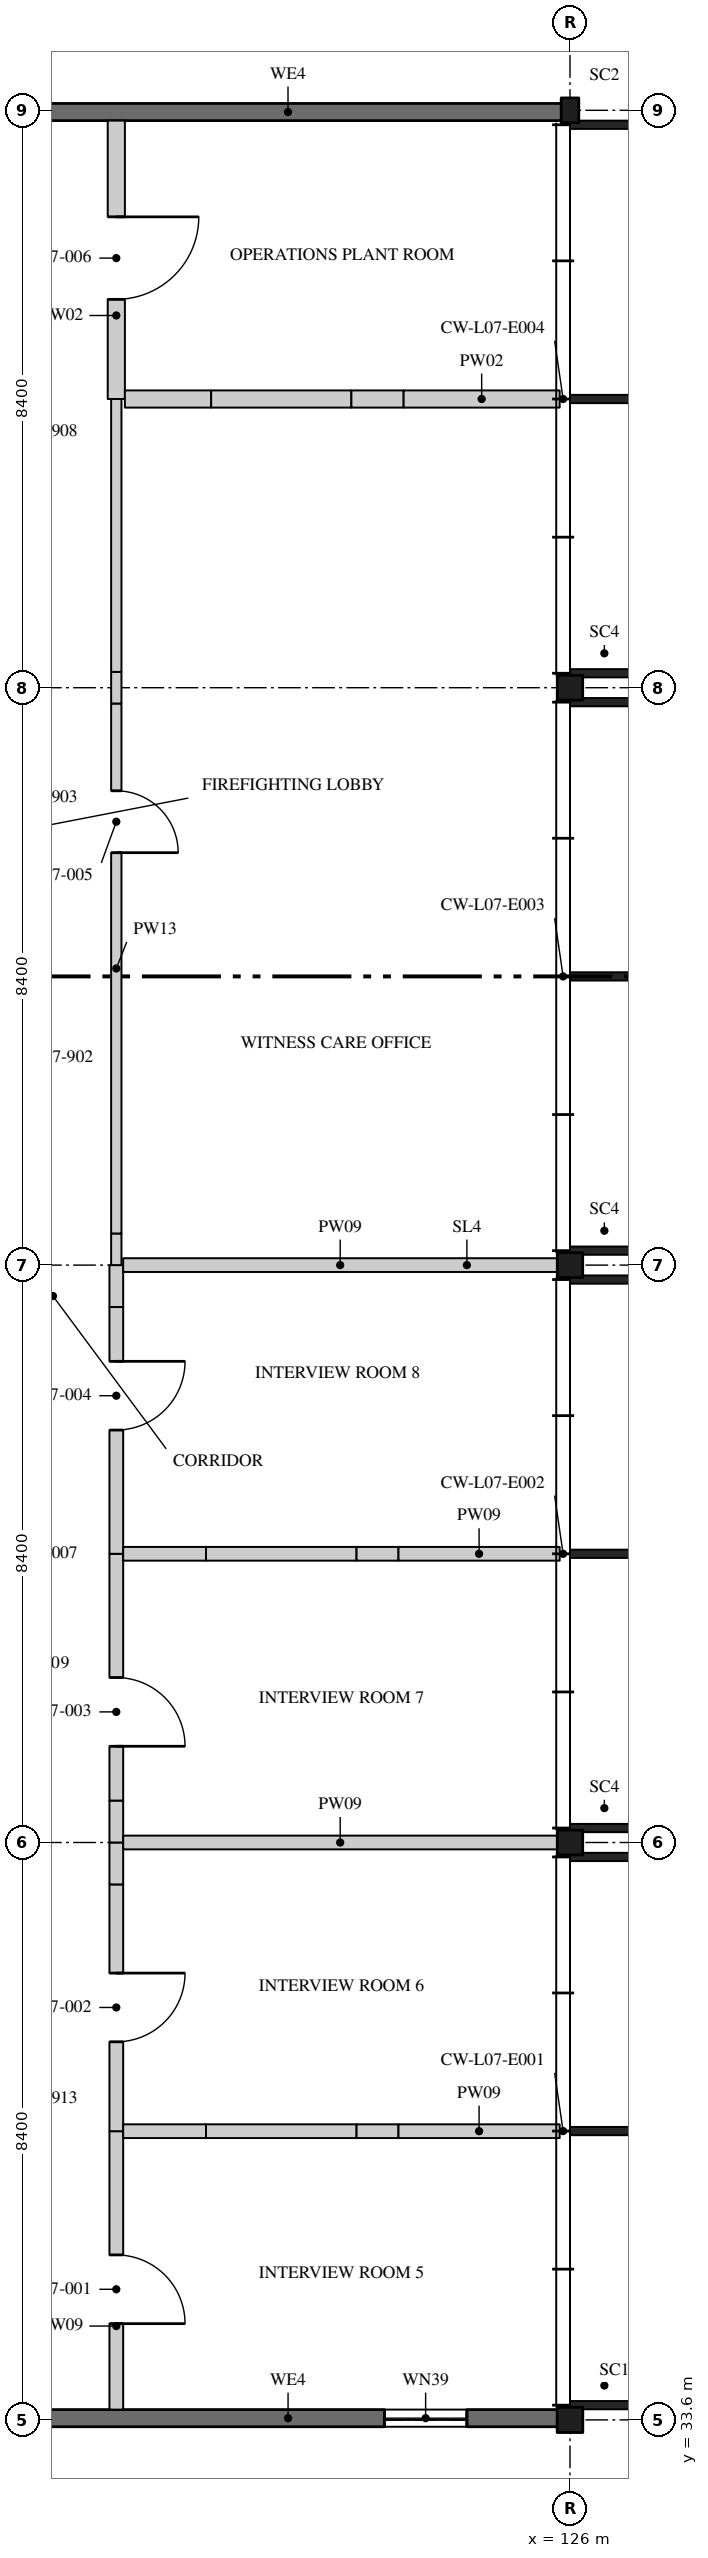
"""IFC4 building model, lengths in metres.
Left out: names, types, materials, properties, quantities, classifications, styles, units other than length and angle.
Written with IfcOpenShell. Run it as: python <this file> out.ifc"""

import sys

from ifc_helpers import new_model, si_unit, direction, frame, frame_2d, origin, origin_2d, place, context, subcontext, project, spatial, rectangle, i_section, extrude, element, fill, save


model = new_model("IFC4")
c1 = context("Model", 3, precision=1e-05, world=origin(), true_north=direction((0.0, 1.0)))
c2 = subcontext(c1, "Body", "Model", "MODEL_VIEW")
j1 = project(units=[si_unit("LENGTHUNIT", "METRE"), si_unit("PLANEANGLEUNIT", "RADIAN")], contexts=[c1])
p1 = place(None, origin())
s1 = spatial("IfcSite", under=j1, at=p1, CompositionType="ELEMENT")
p2 = place(p1, origin())
s2 = spatial("IfcBuilding", under=s1, at=p2, CompositionType="ELEMENT")
p3 = place(p2, frame((0.0, 0.0, 32.4)))
s3 = spatial("IfcBuildingStorey", under=s2, at=p3, CompositionType="ELEMENT", Elevation=32.4)
p4 = place(p3, frame((126.0, 33.6, 0.0), z_axis=(0.0, 0.0, 1.0), x_axis=(1.0, 0.0, 0.0)))
e1 = element("IfcColumn", 1, at=p4, inside=s3, PredefinedType="COLUMN", context=c2, shape_type="SweptSolid", body=[
    extrude(i_section(OverallWidth=0.373, OverallDepth=0.368, WebThickness=0.015, FlangeThickness=0.024, FilletRadius=0.015, at=origin_2d()), origin(), (0.0, 0.0, 1.0), 4.37),
])
for number, where, z_axis, x_axis in (
    (2, (126.0, 42.0, 0.0), (0.0, 0.0, 1.0), (1.0, 0.0, 0.0)),
    (3, (126.0, 50.4, 0.0), (0.0, 0.0, 1.0), (1.0, 0.0, 0.0)),
    (4, (126.0, 58.8, 0.0), (0.0, 0.0, 1.0), (1.0, 0.0, 0.0)),
):
    element("IfcColumn", number, at=place(p3, frame(where, z_axis=z_axis, x_axis=x_axis)), inside=s3, PredefinedType="COLUMN", context=c2, shape_type="SweptSolid", body=[
        extrude(i_section(OverallWidth=0.371, OverallDepth=0.361, WebThickness=0.012, FlangeThickness=0.02, FilletRadius=0.015, at=origin_2d()), origin(), (0.0, 0.0, 1.0), 4.37),
    ])
p5 = place(p3, frame((126.0, 67.2, 0.0), z_axis=(0.0, 0.0, 1.0), x_axis=(1.0, 0.0, 0.0)))
e5 = element("IfcColumn", 5, at=p5, inside=s3, PredefinedType="COLUMN", context=c2, shape_type="SweptSolid", body=[
    extrude(i_section(OverallWidth=0.257, OverallDepth=0.361, WebThickness=0.011, FlangeThickness=0.02, FilletRadius=0.015, at=origin_2d()), origin(), (0.0, 0.0, 1.0), 4.37),
])
p6 = place(p3, frame((119.4, 33.75, 0.0), z_axis=(0.0, 0.0, 1.0), x_axis=(0.0, 1.0, 0.0)))
e6 = element("IfcWall", 6, at=p6, inside=s3, PredefinedType="PARTITIONING", context=c2, shape_type="SweptSolid", body=[
    extrude(rectangle(XDim=4.05, YDim=0.2, at=frame_2d((2.025, 0.0))), origin(), (0.0, 0.0, 1.0), 4.37),
])
p7 = place(p6, frame((1.25, 0.0, 0.0)))
e7 = element("IfcOpeningElement", 7, at=p7, cuts=e6, PredefinedType="OPENING", context=c2, shape_type="SweptSolid", body=[
    extrude(rectangle(XDim=1.0, YDim=2.1, at=frame_2d((0.5, 1.05))), frame((0.0, 0.11, 0.0), z_axis=(0.0, -1.0, 0.0), x_axis=(1.0, 0.0, 0.0)), (0.0, 0.0, 1.0), 0.22),
])
p8 = place(p3, frame((119.4, 37.8, 0.0), z_axis=(0.0, 0.0, 1.0), x_axis=(0.0, 1.0, 0.0)))
e8 = element("IfcWall", 8, at=p8, inside=s3, PredefinedType="PARTITIONING", context=c2, shape_type="SweptSolid", body=[
    extrude(rectangle(XDim=3.59, YDim=0.2, at=frame_2d((1.795, 0.0))), origin(), (0.0, 0.0, 1.0), 4.37),
])
p9 = place(p8, frame((1.3, 0.0, 0.0)))
e9 = element("IfcOpeningElement", 9, at=p9, cuts=e8, PredefinedType="OPENING", context=c2, shape_type="SweptSolid", body=[
    extrude(rectangle(XDim=1.0, YDim=2.1, at=frame_2d((0.5, 1.05))), frame((0.0, 0.11, 0.0), z_axis=(0.0, -1.0, 0.0), x_axis=(1.0, 0.0, 0.0)), (0.0, 0.0, 1.0), 0.22),
])
for number, where, z_axis, x_axis in (
    (10, (119.4, 41.39, 0.0), (0.0, 0.0, 1.0), (0.0, 1.0, 0.0)),
    (11, (119.4, 42.0, 0.0), (0.0, 0.0, 1.0), (0.0, 1.0, 0.0)),
):
    element("IfcWall", number, at=place(p3, frame(where, z_axis=z_axis, x_axis=x_axis)), inside=s3, PredefinedType="PARTITIONING", context=c2, shape_type="SweptSolid", body=[
        extrude(rectangle(XDim=0.61, YDim=0.2, at=frame_2d((0.305, 0.0))), origin(), (0.0, 0.0, 1.0), 3.746),
    ])
p10 = place(p3, frame((119.4, 42.61, 0.0), z_axis=(0.0, 0.0, 1.0), x_axis=(0.0, 1.0, 0.0)))
e12 = element("IfcWall", 12, at=p10, inside=s3, PredefinedType="PARTITIONING", context=c2, shape_type="SweptSolid", body=[
    extrude(rectangle(XDim=3.59, YDim=0.2, at=frame_2d((1.795, 0.0))), origin(), (0.0, 0.0, 1.0), 4.37),
])
p11 = place(p10, frame((0.79, 0.0, 0.0)))
e13 = element("IfcOpeningElement", 13, at=p11, cuts=e12, PredefinedType="OPENING", context=c2, shape_type="SweptSolid", body=[
    extrude(rectangle(XDim=1.0, YDim=2.1, at=frame_2d((0.5, 1.05))), frame((0.0, 0.11, 0.0), z_axis=(0.0, -1.0, 0.0), x_axis=(1.0, 0.0, 0.0)), (0.0, 0.0, 1.0), 0.22),
])
p12 = place(p3, frame((119.4, 46.2, 0.0), z_axis=(0.0, 0.0, 1.0), x_axis=(0.0, 1.0, 0.0)))
e14 = element("IfcWall", 14, at=p12, inside=s3, PredefinedType="PARTITIONING", context=c2, shape_type="SweptSolid", body=[
    extrude(rectangle(XDim=3.59, YDim=0.2, at=frame_2d((1.795, 0.0))), origin(), (0.0, 0.0, 1.0), 4.37),
])
p13 = place(p12, frame((1.8, 0.0, 0.0)))
e15 = element("IfcOpeningElement", 15, at=p13, cuts=e14, PredefinedType="OPENING", context=c2, shape_type="SweptSolid", body=[
    extrude(rectangle(XDim=1.0, YDim=2.1, at=frame_2d((0.5, 1.05))), frame((0.0, 0.11, 0.0), z_axis=(0.0, -1.0, 0.0), x_axis=(1.0, 0.0, 0.0)), (0.0, 0.0, 1.0), 0.22),
])
p14 = place(p3, frame((119.4, 49.79, 0.0), z_axis=(0.0, 0.0, 1.0), x_axis=(0.0, 1.0, 0.0)))
e16 = element("IfcWall", 16, at=p14, inside=s3, PredefinedType="PARTITIONING", context=c2, shape_type="SweptSolid", body=[
    extrude(rectangle(XDim=0.61, YDim=0.2, at=frame_2d((0.305, 0.0))), origin(), (0.0, 0.0, 1.0), 3.746),
])
p15 = place(p3, frame((119.4, 50.4, 0.0), z_axis=(0.0, 0.0, 1.0), x_axis=(0.0, 1.0, 0.0)))
e17 = element("IfcWall", 17, at=p15, inside=s3, PredefinedType="PARTITIONING", context=c2, shape_type="SweptSolid", body=[
    extrude(rectangle(XDim=0.46, YDim=0.15, at=frame_2d((0.23, 0.0))), origin(), (0.0, 0.0, 1.0), 3.746),
])
p16 = place(p3, frame((119.4, 50.86, 0.0), z_axis=(0.0, 0.0, 1.0), x_axis=(0.0, 1.0, 0.0)))
e18 = element("IfcWall", 18, at=p16, inside=s3, PredefinedType="PARTITIONING", context=c2, shape_type="SweptSolid", body=[
    extrude(rectangle(XDim=7.71, YDim=0.15, at=frame_2d((3.855, 0.0))), origin(), (0.0, 0.0, 1.0), 4.37),
])
p17 = place(p16, frame((5.54, 0.0, 0.0)))
e19 = element("IfcOpeningElement", 19, at=p17, cuts=e18, PredefinedType="OPENING", context=c2, shape_type="SweptSolid", body=[
    extrude(rectangle(XDim=0.9, YDim=2.1, at=frame_2d((0.45, 1.05))), frame((0.0, 0.085, 0.0), z_axis=(0.0, -1.0, 0.0), x_axis=(1.0, 0.0, 0.0)), (0.0, 0.0, 1.0), 0.17),
])
p18 = place(p3, frame((119.4, 58.57, 0.0), z_axis=(0.0, 0.0, 1.0), x_axis=(0.0, 1.0, 0.0)))
e20 = element("IfcWall", 20, at=p18, inside=s3, PredefinedType="PARTITIONING", context=c2, shape_type="SweptSolid", body=[
    extrude(rectangle(XDim=0.46, YDim=0.15, at=frame_2d((0.23, 0.0))), origin(), (0.0, 0.0, 1.0), 3.746),
])
p19 = place(p3, frame((119.4, 59.03, 0.0), z_axis=(0.0, 0.0, 1.0), x_axis=(0.0, 1.0, 0.0)))
e21 = element("IfcWall", 21, at=p19, inside=s3, PredefinedType="PARTITIONING", context=c2, shape_type="SweptSolid", body=[
    extrude(rectangle(XDim=3.97, YDim=0.15, at=frame_2d((1.985, 0.0))), origin(), (0.0, 0.0, 1.0), 4.37),
])
p20 = place(p3, frame((119.4, 63.0, 0.0), z_axis=(0.0, 0.0, 1.0), x_axis=(0.0, 1.0, 0.0)))
e22 = element("IfcWall", 22, at=p20, inside=s3, PredefinedType="PARTITIONING", context=c2, shape_type="SweptSolid", body=[
    extrude(rectangle(XDim=4.05, YDim=0.25, at=frame_2d((2.025, 0.0))), origin(), (0.0, 0.0, 1.0), 4.37),
])
p21 = place(p20, frame((1.45, 0.0, 0.0)))
e23 = element("IfcOpeningElement", 23, at=p21, cuts=e22, PredefinedType="OPENING", context=c2, shape_type="SweptSolid", body=[
    extrude(rectangle(XDim=1.2, YDim=2.4, at=frame_2d((0.6, 1.2))), frame((0.0, 0.135, 0.0), z_axis=(0.0, -1.0, 0.0), x_axis=(1.0, 0.0, 0.0)), (0.0, 0.0, 1.0), 0.27),
])
p22 = place(p3, frame((119.5, 37.8, 0.0), z_axis=(0.0, 0.0, 1.0), x_axis=(1.0, 0.0, 0.0)))
e24 = element("IfcWall", 24, at=p22, inside=s3, PredefinedType="PARTITIONING", context=c2, shape_type="SweptSolid", body=[
    extrude(rectangle(XDim=1.205, YDim=0.2, at=frame_2d((0.603, 0.0))), origin(), (0.0, 0.0, 1.0), 3.895),
])
p23 = place(p3, frame((120.705, 37.8, 0.0), z_axis=(0.0, 0.0, 1.0), x_axis=(1.0, 0.0, 0.0)))
e25 = element("IfcWall", 25, at=p23, inside=s3, PredefinedType="PARTITIONING", context=c2, shape_type="SweptSolid", body=[
    extrude(rectangle(XDim=2.19, YDim=0.2, at=frame_2d((1.095, 0.0))), origin(), (0.0, 0.0, 1.0), 4.37),
])
p24 = place(p3, frame((122.895, 37.8, 0.0), z_axis=(0.0, 0.0, 1.0), x_axis=(1.0, 0.0, 0.0)))
e26 = element("IfcWall", 26, at=p24, inside=s3, PredefinedType="PARTITIONING", context=c2, shape_type="SweptSolid", body=[
    extrude(rectangle(XDim=0.61, YDim=0.2, at=frame_2d((0.305, 0.0))), origin(), (0.0, 0.0, 1.0), 3.895),
])
p25 = place(p3, frame((123.505, 37.8, 0.0), z_axis=(0.0, 0.0, 1.0), x_axis=(1.0, 0.0, 0.0)))
e27 = element("IfcWall", 27, at=p25, inside=s3, PredefinedType="PARTITIONING", context=c2, shape_type="SweptSolid", body=[
    extrude(rectangle(XDim=2.345, YDim=0.2, at=frame_2d((1.173, 0.0))), origin(), (0.0, 0.0, 1.0), 4.37),
])
p26 = place(p3, frame((119.5, 42.0, 0.0), z_axis=(0.0, 0.0, 1.0), x_axis=(1.0, 0.0, 0.0)))
e28 = element("IfcWall", 28, at=p26, inside=s3, PredefinedType="PARTITIONING", context=c2, shape_type="SweptSolid", body=[
    extrude(rectangle(XDim=6.314, YDim=0.2, at=frame_2d((3.157, 0.0))), origin(), (0.0, 0.0, 1.0), 3.746),
])
p27 = place(p3, frame((119.5, 46.2, 0.0), z_axis=(0.0, 0.0, 1.0), x_axis=(1.0, 0.0, 0.0)))
e29 = element("IfcWall", 29, at=p27, inside=s3, PredefinedType="PARTITIONING", context=c2, shape_type="SweptSolid", body=[
    extrude(rectangle(XDim=1.205, YDim=0.2, at=frame_2d((0.603, 0.0))), origin(), (0.0, 0.0, 1.0), 3.895),
])
p28 = place(p3, frame((120.705, 46.2, 0.0), z_axis=(0.0, 0.0, 1.0), x_axis=(1.0, 0.0, 0.0)))
e30 = element("IfcWall", 30, at=p28, inside=s3, PredefinedType="PARTITIONING", context=c2, shape_type="SweptSolid", body=[
    extrude(rectangle(XDim=2.19, YDim=0.2, at=frame_2d((1.095, 0.0))), origin(), (0.0, 0.0, 1.0), 4.37),
])
p29 = place(p3, frame((122.895, 46.2, 0.0), z_axis=(0.0, 0.0, 1.0), x_axis=(1.0, 0.0, 0.0)))
e31 = element("IfcWall", 31, at=p29, inside=s3, PredefinedType="PARTITIONING", context=c2, shape_type="SweptSolid", body=[
    extrude(rectangle(XDim=0.61, YDim=0.2, at=frame_2d((0.305, 0.0))), origin(), (0.0, 0.0, 1.0), 3.895),
])
p30 = place(p3, frame((123.505, 46.2, 0.0), z_axis=(0.0, 0.0, 1.0), x_axis=(1.0, 0.0, 0.0)))
e32 = element("IfcWall", 32, at=p30, inside=s3, PredefinedType="PARTITIONING", context=c2, shape_type="SweptSolid", body=[
    extrude(rectangle(XDim=2.345, YDim=0.2, at=frame_2d((1.173, 0.0))), origin(), (0.0, 0.0, 1.0), 4.37),
])
p31 = place(p3, frame((119.5, 50.4, 0.0), z_axis=(0.0, 0.0, 1.0), x_axis=(1.0, 0.0, 0.0)))
e33 = element("IfcWall", 33, at=p31, inside=s3, PredefinedType="PARTITIONING", context=c2, shape_type="SweptSolid", body=[
    extrude(rectangle(XDim=6.314, YDim=0.2, at=frame_2d((3.157, 0.0))), origin(), (0.0, 0.0, 1.0), 3.746),
])
p32 = place(p3, frame((119.525, 63.0, 0.0), z_axis=(0.0, 0.0, 1.0), x_axis=(1.0, 0.0, 0.0)))
e34 = element("IfcWall", 34, at=p32, inside=s3, PredefinedType="PARTITIONING", context=c2, shape_type="SweptSolid", body=[
    extrude(rectangle(XDim=1.255, YDim=0.25, at=frame_2d((0.627, 0.0))), origin(), (0.0, 0.0, 1.0), 3.895),
])
p33 = place(p3, frame((120.78, 63.0, 0.0), z_axis=(0.0, 0.0, 1.0), x_axis=(1.0, 0.0, 0.0)))
e35 = element("IfcWall", 35, at=p33, inside=s3, PredefinedType="PARTITIONING", context=c2, shape_type="SweptSolid", body=[
    extrude(rectangle(XDim=2.04, YDim=0.25, at=frame_2d((1.02, 0.0))), origin(), (0.0, 0.0, 1.0), 4.37),
])
p34 = place(p3, frame((122.82, 63.0, 0.0), z_axis=(0.0, 0.0, 1.0), x_axis=(1.0, 0.0, 0.0)))
e36 = element("IfcWall", 36, at=p34, inside=s3, PredefinedType="PARTITIONING", context=c2, shape_type="SweptSolid", body=[
    extrude(rectangle(XDim=0.76, YDim=0.25, at=frame_2d((0.38, 0.0))), origin(), (0.0, 0.0, 1.0), 3.895),
])
p35 = place(p3, frame((123.58, 63.0, 0.0), z_axis=(0.0, 0.0, 1.0), x_axis=(1.0, 0.0, 0.0)))
e37 = element("IfcWall", 37, at=p35, inside=s3, PredefinedType="PARTITIONING", context=c2, shape_type="SweptSolid", body=[
    extrude(rectangle(XDim=2.27, YDim=0.25, at=frame_2d((1.135, 0.0))), origin(), (0.0, 0.0, 1.0), 4.37),
])
p36 = place(p3, frame((125.996, 67.175, 0.0), z_axis=(0.0, 0.0, 1.0), x_axis=(-1.0, 0.0, 0.0)))
e38 = element("IfcWall", 38, at=p36, inside=s3, PredefinedType="SOLIDWALL", context=c2, shape_type="SweptSolid", body=[
    extrude(rectangle(XDim=8.196, YDim=0.25, at=frame_2d((4.098, 0.0))), origin(), (0.0, 0.0, 1.0), 3.746),
])
p37 = place(p3, frame((117.8, 33.625, 0.0), z_axis=(0.0, 0.0, 1.0), x_axis=(1.0, 0.0, 0.0)))
e39 = element("IfcWall", 39, at=p37, inside=s3, PredefinedType="SOLIDWALL", context=c2, shape_type="SweptSolid", body=[
    extrude(rectangle(XDim=8.197, YDim=0.25, at=frame_2d((4.099, 0.0))), origin(), (0.0, 0.0, 1.0), 3.746),
])
p38 = place(p37, frame((5.5, 0.0, 2.1)))
e40 = element("IfcOpeningElement", 40, at=p38, cuts=e39, PredefinedType="OPENING", context=c2, shape_type="SweptSolid", body=[
    extrude(rectangle(XDim=1.2, YDim=0.45, at=frame_2d((0.6, 0.225))), frame((0.0, 0.135, 0.0), z_axis=(0.0, -1.0, 0.0), x_axis=(1.0, 0.0, 0.0)), (0.0, 0.0, 1.0), 0.27),
])
p39 = place(p7, frame((1.0, 0.0, 0.0), z_axis=(0.0, 0.0, 1.0), x_axis=(-1.0, 0.0, 0.0)))
e41 = element("IfcDoor", 41, at=p39, inside=s3, OperationType="SINGLE_SWING_LEFT", PredefinedType="DOOR", context=c2, shape_type="SweptSolid", body=[
    extrude(rectangle(XDim=1.0, YDim=2.1, at=frame_2d((0.5, 1.05))), frame((0.0, 0.045, 0.0), z_axis=(0.0, -1.0, 0.0), x_axis=(1.0, 0.0, 0.0)), (0.0, 0.0, 1.0), 0.09),
])
fill(e7, e41)
p40 = place(p9, frame((1.0, 0.0, 0.0), z_axis=(0.0, 0.0, 1.0), x_axis=(-1.0, 0.0, 0.0)))
e42 = element("IfcDoor", 42, at=p40, inside=s3, OperationType="SINGLE_SWING_RIGHT", PredefinedType="DOOR", context=c2, shape_type="SweptSolid", body=[
    extrude(rectangle(XDim=1.0, YDim=2.1, at=frame_2d((0.5, 1.05))), frame((0.0, 0.045, 0.0), z_axis=(0.0, -1.0, 0.0), x_axis=(1.0, 0.0, 0.0)), (0.0, 0.0, 1.0), 0.09),
])
fill(e9, e42)
p41 = place(p11, frame((1.0, 0.0, 0.0), z_axis=(0.0, 0.0, 1.0), x_axis=(-1.0, 0.0, 0.0)))
e43 = element("IfcDoor", 43, at=p41, inside=s3, OperationType="SINGLE_SWING_LEFT", PredefinedType="DOOR", context=c2, shape_type="SweptSolid", body=[
    extrude(rectangle(XDim=1.0, YDim=2.1, at=frame_2d((0.5, 1.05))), frame((0.0, 0.045, 0.0), z_axis=(0.0, -1.0, 0.0), x_axis=(1.0, 0.0, 0.0)), (0.0, 0.0, 1.0), 0.09),
])
fill(e13, e43)
p42 = place(p13, frame((1.0, 0.0, 0.0), z_axis=(0.0, 0.0, 1.0), x_axis=(-1.0, 0.0, 0.0)))
e44 = element("IfcDoor", 44, at=p42, inside=s3, OperationType="SINGLE_SWING_RIGHT", PredefinedType="DOOR", context=c2, shape_type="SweptSolid", body=[
    extrude(rectangle(XDim=1.0, YDim=2.1, at=frame_2d((0.5, 1.05))), frame((0.0, 0.045, 0.0), z_axis=(0.0, -1.0, 0.0), x_axis=(1.0, 0.0, 0.0)), (0.0, 0.0, 1.0), 0.09),
])
fill(e15, e44)
p43 = place(p17, frame((0.9, 0.0, 0.0), z_axis=(0.0, 0.0, 1.0), x_axis=(-1.0, 0.0, 0.0)))
e45 = element("IfcDoor", 45, at=p43, inside=s3, OperationType="SINGLE_SWING_LEFT", PredefinedType="DOOR", context=c2, shape_type="SweptSolid", body=[
    extrude(rectangle(XDim=0.9, YDim=2.1, at=frame_2d((0.45, 1.05))), frame((0.0, 0.025, 0.0), z_axis=(0.0, -1.0, 0.0), x_axis=(1.0, 0.0, 0.0)), (0.0, 0.0, 1.0), 0.05),
])
fill(e19, e45)
p44 = place(p21, frame((1.2, 0.0, 0.0), z_axis=(0.0, 0.0, 1.0), x_axis=(-1.0, 0.0, 0.0)))
e46 = element("IfcDoor", 46, at=p44, inside=s3, OperationType="SINGLE_SWING_RIGHT", PredefinedType="DOOR", context=c2, shape_type="SweptSolid", body=[
    extrude(rectangle(XDim=1.2, YDim=2.4, at=frame_2d((0.6, 1.2))), frame((0.0, 0.05, 0.0), z_axis=(0.0, -1.0, 0.0), x_axis=(1.0, 0.0, 0.0)), (0.0, 0.0, 1.0), 0.1),
])
fill(e23, e46)
p45 = place(p38, origin())
e47 = element("IfcWindow", 47, at=p45, inside=s3, PartitioningType="SINGLE_PANEL", PredefinedType="WINDOW", context=c2, shape_type="SweptSolid", body=[
    extrude(rectangle(XDim=1.2, YDim=0.45, at=frame_2d((0.6, 0.225))), frame((0.0, 0.05, 0.0), z_axis=(0.0, -1.0, 0.0), x_axis=(1.0, 0.0, 0.0)), (0.0, 0.0, 1.0), 0.1),
])
fill(e40, e47)
save(model, sys.argv[1])
